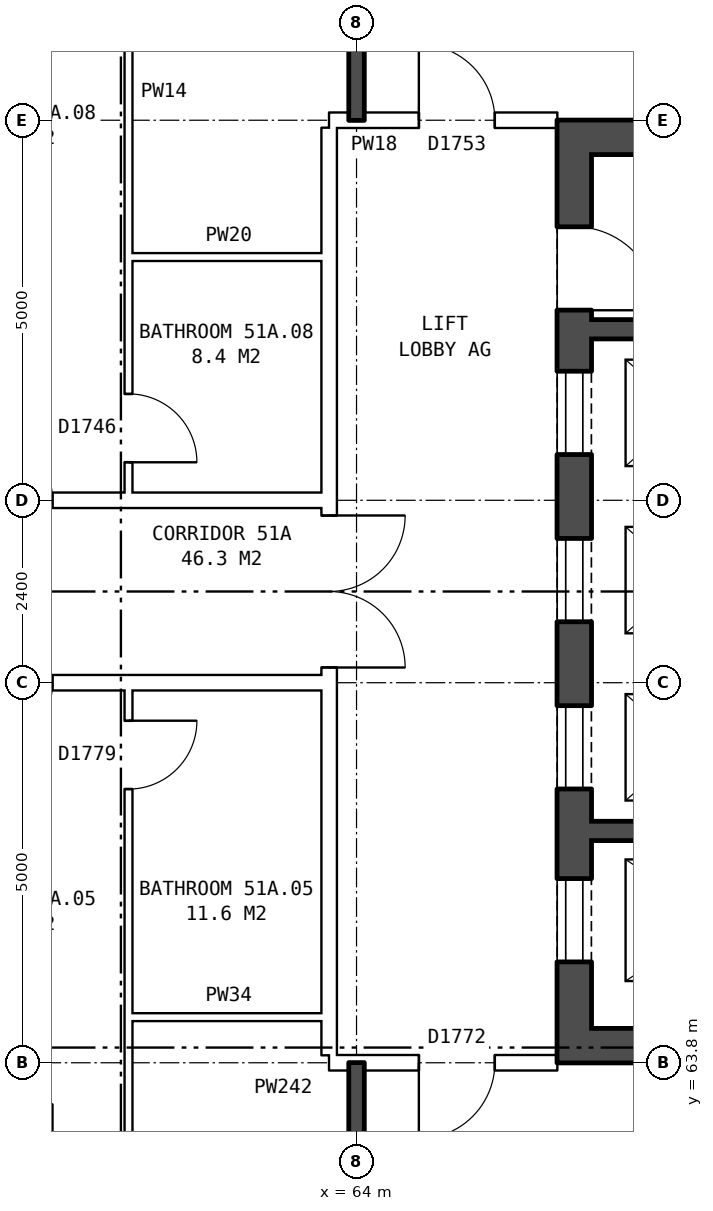
"""IFC4 building model, lengths in metres.
Left out: names, types, materials, properties, quantities, classifications, styles, units other than length and angle.
Written with IfcOpenShell. Run it as: python <this file> out.ifc"""

import sys

from ifc_helpers import new_model, si_unit, direction, frame, frame_2d, origin, place, context, subcontext, project, spatial, rectangle, extrude, element, fill, save


model = new_model("IFC4")
c1 = context("Model", 3, precision=1e-05, world=origin(), true_north=direction((0.0, 1.0)))
c2 = subcontext(c1, "Body", "Model", "MODEL_VIEW")
j1 = project(units=[si_unit("LENGTHUNIT", "METRE"), si_unit("PLANEANGLEUNIT", "RADIAN")], contexts=[c1])
p1 = place(None, origin())
s1 = spatial("IfcSite", under=j1, at=p1, CompositionType="ELEMENT")
p2 = place(p1, origin())
s2 = spatial("IfcBuilding", under=s1, at=p2, CompositionType="ELEMENT")
p3 = place(p2, frame((0.0, 0.0, 182.0)))
s3 = spatial("IfcBuildingStorey", under=s2, at=p3, CompositionType="ELEMENT", Elevation=182.0)
p4 = place(p3, frame((66.865, 63.8, 0.0), z_axis=(0.0, 0.0, 1.0), x_axis=(0.0, 1.0, 0.0)))
e1 = element("IfcWall", 1, at=p4, inside=s3, PredefinedType="SHEAR", context=c2, shape_type="SweptSolid", body=[
    extrude(rectangle(XDim=12.4, YDim=0.45, at=frame_2d((6.2, 0.0))), origin(), (0.0, 0.0, 1.0), 2.85),
])
p5 = place(p4, frame((1.325, 0.0, 0.0)))
e2 = element("IfcOpeningElement", 2, at=p5, cuts=e1, PredefinedType="OPENING", context=c2, shape_type="SweptSolid", body=[
    extrude(rectangle(XDim=1.1, YDim=2.1, at=frame_2d((0.55, 1.05))), frame((0.0, 0.235, 0.0), z_axis=(0.0, -1.0, 0.0), x_axis=(1.0, 0.0, 0.0)), (0.0, 0.0, 1.0), 0.47),
])
p6 = place(p4, frame((3.6, 0.0, 0.0)))
e3 = element("IfcOpeningElement", 3, at=p6, cuts=e1, PredefinedType="OPENING", context=c2, shape_type="SweptSolid", body=[
    extrude(rectangle(XDim=1.1, YDim=2.1, at=frame_2d((0.55, 1.05))), frame((0.0, 0.235, 0.0), z_axis=(0.0, -1.0, 0.0), x_axis=(1.0, 0.0, 0.0)), (0.0, 0.0, 1.0), 0.47),
])
p7 = place(p4, frame((5.8, 0.0, 0.0)))
e4 = element("IfcOpeningElement", 4, at=p7, cuts=e1, PredefinedType="OPENING", context=c2, shape_type="SweptSolid", body=[
    extrude(rectangle(XDim=1.1, YDim=2.1, at=frame_2d((0.55, 1.05))), frame((0.0, 0.235, 0.0), z_axis=(0.0, -1.0, 0.0), x_axis=(1.0, 0.0, 0.0)), (0.0, 0.0, 1.0), 0.47),
])
p8 = place(p4, frame((8.0, 0.0, 0.0)))
e5 = element("IfcOpeningElement", 5, at=p8, cuts=e1, PredefinedType="OPENING", context=c2, shape_type="SweptSolid", body=[
    extrude(rectangle(XDim=1.1, YDim=2.1, at=frame_2d((0.55, 1.05))), frame((0.0, 0.235, 0.0), z_axis=(0.0, -1.0, 0.0), x_axis=(1.0, 0.0, 0.0)), (0.0, 0.0, 1.0), 0.47),
])
p9 = place(p4, frame((9.9, 0.0, 0.0)))
e6 = element("IfcOpeningElement", 6, at=p9, cuts=e1, PredefinedType="OPENING", context=c2, shape_type="SweptSolid", body=[
    extrude(rectangle(XDim=1.1, YDim=2.1, at=frame_2d((0.55, 1.05))), frame((0.0, 0.235, 0.0), z_axis=(0.0, -1.0, 0.0), x_axis=(1.0, 0.0, 0.0)), (0.0, 0.0, 1.0), 0.47),
])
for number, where, z_axis, x_axis in (
    (7, (67.09, 64.025, 0.0), (0.0, 0.0, 1.0), (1.0, 0.0, 0.0)),
    (8, (67.09, 75.975, 0.0), (0.0, 0.0, 1.0), (1.0, 0.0, 0.0)),
):
    element("IfcWall", number, at=place(p3, frame(where, z_axis=z_axis, x_axis=x_axis)), inside=s3, PredefinedType="SHEAR", context=c2, shape_type="SweptSolid", body=[
        extrude(rectangle(XDim=8.1, YDim=0.45, at=frame_2d((4.05, 0.0))), origin(), (0.0, 0.0, 1.0), 2.85),
    ])
p10 = place(p3, frame((67.09, 66.85, 0.0), z_axis=(0.0, 0.0, 1.0), x_axis=(1.0, 0.0, 0.0)))
e9 = element("IfcWall", 9, at=p10, inside=s3, PredefinedType="SHEAR", context=c2, shape_type="SweptSolid", body=[
    extrude(rectangle(XDim=3.545, YDim=0.25, at=frame_2d((1.772, 0.0))), origin(), (0.0, 0.0, 1.0), 2.85),
])
p11 = place(p3, frame((67.09, 73.45, 0.0), z_axis=(0.0, 0.0, 1.0), x_axis=(1.0, 0.0, 0.0)))
e10 = element("IfcWall", 10, at=p11, inside=s3, PredefinedType="SHEAR", context=c2, shape_type="SweptSolid", body=[
    extrude(rectangle(XDim=2.475, YDim=0.25, at=frame_2d((1.237, 0.0))), origin(), (0.0, 0.0, 1.0), 2.85),
])
p12 = place(p3, frame((63.64, 63.9, 0.0), z_axis=(0.0, 0.0, 1.0), x_axis=(0.0, 1.0, 0.0)))
e11 = element("IfcWall", 11, at=p12, inside=s3, PredefinedType="PARTITIONING", context=c2, shape_type="SweptSolid", body=[
    extrude(rectangle(XDim=12.2, YDim=0.2, at=frame_2d((6.1, 0.0))), origin(), (0.0, 0.0, 1.0), 2.85),
])
p13 = place(p12, frame((5.1, 0.0, 0.0)))
e12 = element("IfcOpeningElement", 12, at=p13, cuts=e11, PredefinedType="OPENING", context=c2, shape_type="SweptSolid", body=[
    extrude(rectangle(XDim=2.0, YDim=2.1, at=frame_2d((1.0, 1.05))), frame((0.0, 0.11, 0.0), z_axis=(0.0, -1.0, 0.0), x_axis=(1.0, 0.0, 0.0)), (0.0, 0.0, 1.0), 0.22),
])
p14 = place(p3, frame((63.64, 63.8, 0.0), z_axis=(0.0, 0.0, 1.0), x_axis=(1.0, 0.0, 0.0)))
e13 = element("IfcWall", 13, at=p14, inside=s3, PredefinedType="PARTITIONING", context=c2, shape_type="SweptSolid", body=[
    extrude(rectangle(XDim=3.0, YDim=0.2, at=frame_2d((1.5, 0.0))), origin(), (0.0, 0.0, 1.0), 2.85),
])
p15 = place(p14, frame((1.18, 0.0, 0.0)))
e14 = element("IfcOpeningElement", 14, at=p15, cuts=e13, PredefinedType="OPENING", context=c2, shape_type="SweptSolid", body=[
    extrude(rectangle(XDim=1.0, YDim=2.1, at=frame_2d((0.5, 1.05))), frame((0.0, 0.11, 0.0), z_axis=(0.0, -1.0, 0.0), x_axis=(1.0, 0.0, 0.0)), (0.0, 0.0, 1.0), 0.22),
])
p16 = place(p3, frame((61.0, 64.4, 0.0), z_axis=(0.0, 0.0, 1.0), x_axis=(1.0, 0.0, 0.0)))
e15 = element("IfcWall", 15, at=p16, inside=s3, PredefinedType="PARTITIONING", context=c2, shape_type="SweptSolid", body=[
    extrude(rectangle(XDim=2.64, YDim=0.1, at=frame_2d((1.32, 0.0))), origin(), (0.0, 0.0, 1.0), 2.85),
])
p17 = place(p3, frame((44.36, 68.8, 0.0), z_axis=(0.0, 0.0, 1.0), x_axis=(1.0, 0.0, 0.0)))
e16 = element("IfcWall", 16, at=p17, inside=s3, PredefinedType="PARTITIONING", context=c2, shape_type="SweptSolid", body=[
    extrude(rectangle(XDim=19.28, YDim=0.2, at=frame_2d((9.64, 0.0))), origin(), (0.0, 0.0, 1.0), 2.85),
])
p18 = place(p17, frame((14.64, 0.0, 0.0)))
e17 = element("IfcOpeningElement", 17, at=p18, cuts=e16, PredefinedType="OPENING", context=c2, shape_type="SweptSolid", body=[
    extrude(rectangle(XDim=1.0, YDim=2.1, at=frame_2d((0.5, 1.05))), frame((0.0, 0.11, 0.0), z_axis=(0.0, -1.0, 0.0), x_axis=(1.0, 0.0, 0.0)), (0.0, 0.0, 1.0), 0.22),
])
p19 = place(p17, frame((11.64, 0.0, 0.0)))
e18 = element("IfcOpeningElement", 18, at=p19, cuts=e16, PredefinedType="OPENING", context=c2, shape_type="SweptSolid", body=[
    extrude(rectangle(XDim=1.0, YDim=2.1, at=frame_2d((0.5, 1.05))), frame((0.0, 0.11, 0.0), z_axis=(0.0, -1.0, 0.0), x_axis=(1.0, 0.0, 0.0)), (0.0, 0.0, 1.0), 0.22),
])
p20 = place(p17, frame((5.64, 0.0, 0.0)))
e19 = element("IfcOpeningElement", 19, at=p20, cuts=e16, PredefinedType="OPENING", context=c2, shape_type="SweptSolid", body=[
    extrude(rectangle(XDim=1.0, YDim=2.1, at=frame_2d((0.5, 1.05))), frame((0.0, 0.11, 0.0), z_axis=(0.0, -1.0, 0.0), x_axis=(1.0, 0.0, 0.0)), (0.0, 0.0, 1.0), 0.22),
])
p21 = place(p3, frame((44.36, 71.2, 0.0), z_axis=(0.0, 0.0, 1.0), x_axis=(1.0, 0.0, 0.0)))
e20 = element("IfcWall", 20, at=p21, inside=s3, PredefinedType="PARTITIONING", context=c2, shape_type="SweptSolid", body=[
    extrude(rectangle(XDim=19.28, YDim=0.2, at=frame_2d((9.64, 0.0))), origin(), (0.0, 0.0, 1.0), 2.85),
])
p22 = place(p21, frame((14.64, 0.0, 0.0)))
e21 = element("IfcOpeningElement", 21, at=p22, cuts=e20, PredefinedType="OPENING", context=c2, shape_type="SweptSolid", body=[
    extrude(rectangle(XDim=1.0, YDim=2.1, at=frame_2d((0.5, 1.05))), frame((0.0, 0.11, 0.0), z_axis=(0.0, -1.0, 0.0), x_axis=(1.0, 0.0, 0.0)), (0.0, 0.0, 1.0), 0.22),
])
p23 = place(p21, frame((5.64, 0.0, 0.0)))
e22 = element("IfcOpeningElement", 22, at=p23, cuts=e20, PredefinedType="OPENING", context=c2, shape_type="SweptSolid", body=[
    extrude(rectangle(XDim=1.0, YDim=2.1, at=frame_2d((0.5, 1.05))), frame((0.0, 0.11, 0.0), z_axis=(0.0, -1.0, 0.0), x_axis=(1.0, 0.0, 0.0)), (0.0, 0.0, 1.0), 0.22),
])
p24 = place(p3, frame((61.0, 74.4, 0.0), z_axis=(0.0, 0.0, 1.0), x_axis=(1.0, 0.0, 0.0)))
e23 = element("IfcWall", 23, at=p24, inside=s3, PredefinedType="PARTITIONING", context=c2, shape_type="SweptSolid", body=[
    extrude(rectangle(XDim=2.64, YDim=0.1, at=frame_2d((1.32, 0.0))), origin(), (0.0, 0.0, 1.0), 2.85),
])
p25 = place(p3, frame((63.64, 76.2, 0.0), z_axis=(0.0, 0.0, 1.0), x_axis=(1.0, 0.0, 0.0)))
e24 = element("IfcWall", 24, at=p25, inside=s3, PredefinedType="PARTITIONING", context=c2, shape_type="SweptSolid", body=[
    extrude(rectangle(XDim=3.0, YDim=0.2, at=frame_2d((1.5, 0.0))), origin(), (0.0, 0.0, 1.0), 2.85),
])
p26 = place(p25, frame((1.18, 0.0, 0.0)))
e25 = element("IfcOpeningElement", 25, at=p26, cuts=e24, PredefinedType="OPENING", context=c2, shape_type="SweptSolid", body=[
    extrude(rectangle(XDim=1.0, YDim=2.1, at=frame_2d((0.5, 1.05))), frame((0.0, 0.11, 0.0), z_axis=(0.0, -1.0, 0.0), x_axis=(1.0, 0.0, 0.0)), (0.0, 0.0, 1.0), 0.22),
])
p27 = place(p3, frame((61.0, 54.36, 0.0), z_axis=(0.0, 0.0, 1.0), x_axis=(0.0, 1.0, 0.0)))
e26 = element("IfcWall", 26, at=p27, inside=s3, PredefinedType="PARTITIONING", context=c2, shape_type="SweptSolid", body=[
    extrude(rectangle(XDim=14.34, YDim=0.1, at=frame_2d((7.17, 0.0))), origin(), (0.0, 0.0, 1.0), 2.85),
])
p28 = place(p27, frame((6.7, 0.0, 0.0)))
e27 = element("IfcOpeningElement", 27, at=p28, cuts=e26, PredefinedType="OPENING", context=c2, shape_type="SweptSolid", body=[
    extrude(rectangle(XDim=0.9, YDim=2.1, at=frame_2d((0.45, 1.05))), frame((0.0, 0.06, 0.0), z_axis=(0.0, -1.0, 0.0), x_axis=(1.0, 0.0, 0.0)), (0.0, 0.0, 1.0), 0.12),
])
p29 = place(p27, frame((13.04, 0.0, 0.0)))
e28 = element("IfcOpeningElement", 28, at=p29, cuts=e26, PredefinedType="OPENING", context=c2, shape_type="SweptSolid", body=[
    extrude(rectangle(XDim=0.9, YDim=2.1, at=frame_2d((0.45, 1.05))), frame((0.0, 0.06, 0.0), z_axis=(0.0, -1.0, 0.0), x_axis=(1.0, 0.0, 0.0)), (0.0, 0.0, 1.0), 0.12),
])
p30 = place(p3, frame((61.0, 71.3, 0.0), z_axis=(0.0, 0.0, 1.0), x_axis=(0.0, 1.0, 0.0)))
e29 = element("IfcWall", 29, at=p30, inside=s3, PredefinedType="PARTITIONING", context=c2, shape_type="SweptSolid", body=[
    extrude(rectangle(XDim=14.34, YDim=0.1, at=frame_2d((7.17, 0.0))), origin(), (0.0, 0.0, 1.0), 2.85),
])
p31 = place(p30, frame((9.24, 0.0, 0.0)))
e30 = element("IfcOpeningElement", 30, at=p31, cuts=e29, PredefinedType="OPENING", context=c2, shape_type="SweptSolid", body=[
    extrude(rectangle(XDim=0.9, YDim=2.1, at=frame_2d((0.45, 1.05))), frame((0.0, 0.06, 0.0), z_axis=(0.0, -1.0, 0.0), x_axis=(1.0, 0.0, 0.0)), (0.0, 0.0, 1.0), 0.12),
])
p32 = place(p30, frame((0.4, 0.0, 0.0)))
e31 = element("IfcOpeningElement", 31, at=p32, cuts=e29, PredefinedType="OPENING", context=c2, shape_type="SweptSolid", body=[
    extrude(rectangle(XDim=0.9, YDim=2.1, at=frame_2d((0.45, 1.05))), frame((0.0, 0.06, 0.0), z_axis=(0.0, -1.0, 0.0), x_axis=(1.0, 0.0, 0.0)), (0.0, 0.0, 1.0), 0.12),
])
for number, where, z_axis, x_axis in (
    (32, (64.0, 54.36, 0.0), (0.0, 0.0, 1.0), (0.0, 1.0, 0.0)),
    (33, (64.0, 76.2, 0.0), (0.0, 0.0, 1.0), (0.0, 1.0, 0.0)),
):
    element("IfcWall", number, at=place(p3, frame(where, z_axis=z_axis, x_axis=x_axis)), inside=s3, PredefinedType="SOLIDWALL", context=c2, shape_type="SweptSolid", body=[
        extrude(rectangle(XDim=9.44, YDim=0.2, at=frame_2d((4.72, 0.0))), origin(), (0.0, 0.0, 1.0), 2.85),
    ])
p33 = place(p5, origin())
e34 = element("IfcDoor", 34, at=p33, inside=s3, OperationType="DOUBLE_DOOR_SLIDING", PredefinedType="DOOR", context=c2, shape_type="SweptSolid", body=[
    extrude(rectangle(XDim=1.1, YDim=2.1, at=frame_2d((0.55, 1.05))), frame((0.0, -0.16, 0.0), z_axis=(0.0, -1.0, 0.0), x_axis=(1.0, 0.0, 0.0)), (0.0, 0.0, 1.0), 0.05),
])
fill(e2, e34)
p34 = place(p6, origin())
e35 = element("IfcDoor", 35, at=p34, inside=s3, OperationType="DOUBLE_DOOR_SLIDING", PredefinedType="DOOR", context=c2, shape_type="SweptSolid", body=[
    extrude(rectangle(XDim=1.1, YDim=2.1, at=frame_2d((0.55, 1.05))), frame((0.0, -0.16, 0.0), z_axis=(0.0, -1.0, 0.0), x_axis=(1.0, 0.0, 0.0)), (0.0, 0.0, 1.0), 0.05),
])
fill(e3, e35)
p35 = place(p7, origin())
e36 = element("IfcDoor", 36, at=p35, inside=s3, OperationType="DOUBLE_DOOR_SLIDING", PredefinedType="DOOR", context=c2, shape_type="SweptSolid", body=[
    extrude(rectangle(XDim=1.1, YDim=2.1, at=frame_2d((0.55, 1.05))), frame((0.0, -0.16, 0.0), z_axis=(0.0, -1.0, 0.0), x_axis=(1.0, 0.0, 0.0)), (0.0, 0.0, 1.0), 0.05),
])
fill(e4, e36)
p36 = place(p8, origin())
e37 = element("IfcDoor", 37, at=p36, inside=s3, OperationType="DOUBLE_DOOR_SLIDING", PredefinedType="DOOR", context=c2, shape_type="SweptSolid", body=[
    extrude(rectangle(XDim=1.1, YDim=2.1, at=frame_2d((0.55, 1.05))), frame((0.0, -0.16, 0.0), z_axis=(0.0, -1.0, 0.0), x_axis=(1.0, 0.0, 0.0)), (0.0, 0.0, 1.0), 0.05),
])
fill(e5, e37)
p37 = place(p9, frame((1.1, 0.0, 0.0), z_axis=(0.0, 0.0, 1.0), x_axis=(-1.0, 0.0, 0.0)))
e38 = element("IfcDoor", 38, at=p37, inside=s3, OperationType="SINGLE_SWING_RIGHT", PredefinedType="DOOR", context=c2, shape_type="SweptSolid", body=[
    extrude(rectangle(XDim=1.1, YDim=2.1, at=frame_2d((0.55, 1.05))), frame((0.0, 0.21, 0.0), z_axis=(0.0, -1.0, 0.0), x_axis=(1.0, 0.0, 0.0)), (0.0, 0.0, 1.0), 0.05),
])
fill(e6, e38)
p38 = place(p13, frame((2.0, 0.0, 0.0), z_axis=(0.0, 0.0, 1.0), x_axis=(-1.0, 0.0, 0.0)))
e39 = element("IfcDoor", 39, at=p38, inside=s3, OperationType="DOUBLE_DOOR_SINGLE_SWING", PredefinedType="DOOR", context=c2, shape_type="SweptSolid", body=[
    extrude(rectangle(XDim=2.0, YDim=2.1, at=frame_2d((1.0, 1.05))), frame((0.0, 0.025, 0.0), z_axis=(0.0, -1.0, 0.0), x_axis=(1.0, 0.0, 0.0)), (0.0, 0.0, 1.0), 0.05),
])
fill(e12, e39)
p39 = place(p15, frame((1.0, 0.0, 0.0), z_axis=(0.0, 0.0, 1.0), x_axis=(-1.0, 0.0, 0.0)))
e40 = element("IfcDoor", 40, at=p39, inside=s3, OperationType="SINGLE_SWING_RIGHT", PredefinedType="DOOR", context=c2, shape_type="SweptSolid", body=[
    extrude(rectangle(XDim=1.0, YDim=2.1, at=frame_2d((0.5, 1.05))), frame((0.0, 0.025, 0.0), z_axis=(0.0, -1.0, 0.0), x_axis=(1.0, 0.0, 0.0)), (0.0, 0.0, 1.0), 0.05),
])
fill(e14, e40)
p40 = place(p26, origin())
e41 = element("IfcDoor", 41, at=p40, inside=s3, OperationType="SINGLE_SWING_LEFT", PredefinedType="DOOR", context=c2, shape_type="SweptSolid", body=[
    extrude(rectangle(XDim=1.0, YDim=2.1, at=frame_2d((0.5, 1.05))), frame((0.0, 0.025, 0.0), z_axis=(0.0, -1.0, 0.0), x_axis=(1.0, 0.0, 0.0)), (0.0, 0.0, 1.0), 0.05),
])
fill(e25, e41)
p41 = place(p29, frame((0.9, 0.0, 0.0), z_axis=(0.0, 0.0, 1.0), x_axis=(-1.0, 0.0, 0.0)))
e42 = element("IfcDoor", 42, at=p41, inside=s3, OperationType="SINGLE_SWING_LEFT", PredefinedType="DOOR", context=c2, shape_type="SweptSolid", body=[
    extrude(rectangle(XDim=0.9, YDim=2.1, at=frame_2d((0.45, 1.05))), frame((0.0, 0.025, 0.0), z_axis=(0.0, -1.0, 0.0), x_axis=(1.0, 0.0, 0.0)), (0.0, 0.0, 1.0), 0.05),
])
fill(e28, e42)
p42 = place(p32, frame((0.9, 0.0, 0.0), z_axis=(0.0, 0.0, 1.0), x_axis=(-1.0, 0.0, 0.0)))
e43 = element("IfcDoor", 43, at=p42, inside=s3, OperationType="SINGLE_SWING_RIGHT", PredefinedType="DOOR", context=c2, shape_type="SweptSolid", body=[
    extrude(rectangle(XDim=0.9, YDim=2.1, at=frame_2d((0.45, 1.05))), frame((0.0, 0.025, 0.0), z_axis=(0.0, -1.0, 0.0), x_axis=(1.0, 0.0, 0.0)), (0.0, 0.0, 1.0), 0.05),
])
fill(e31, e43)
save(model, sys.argv[1])
